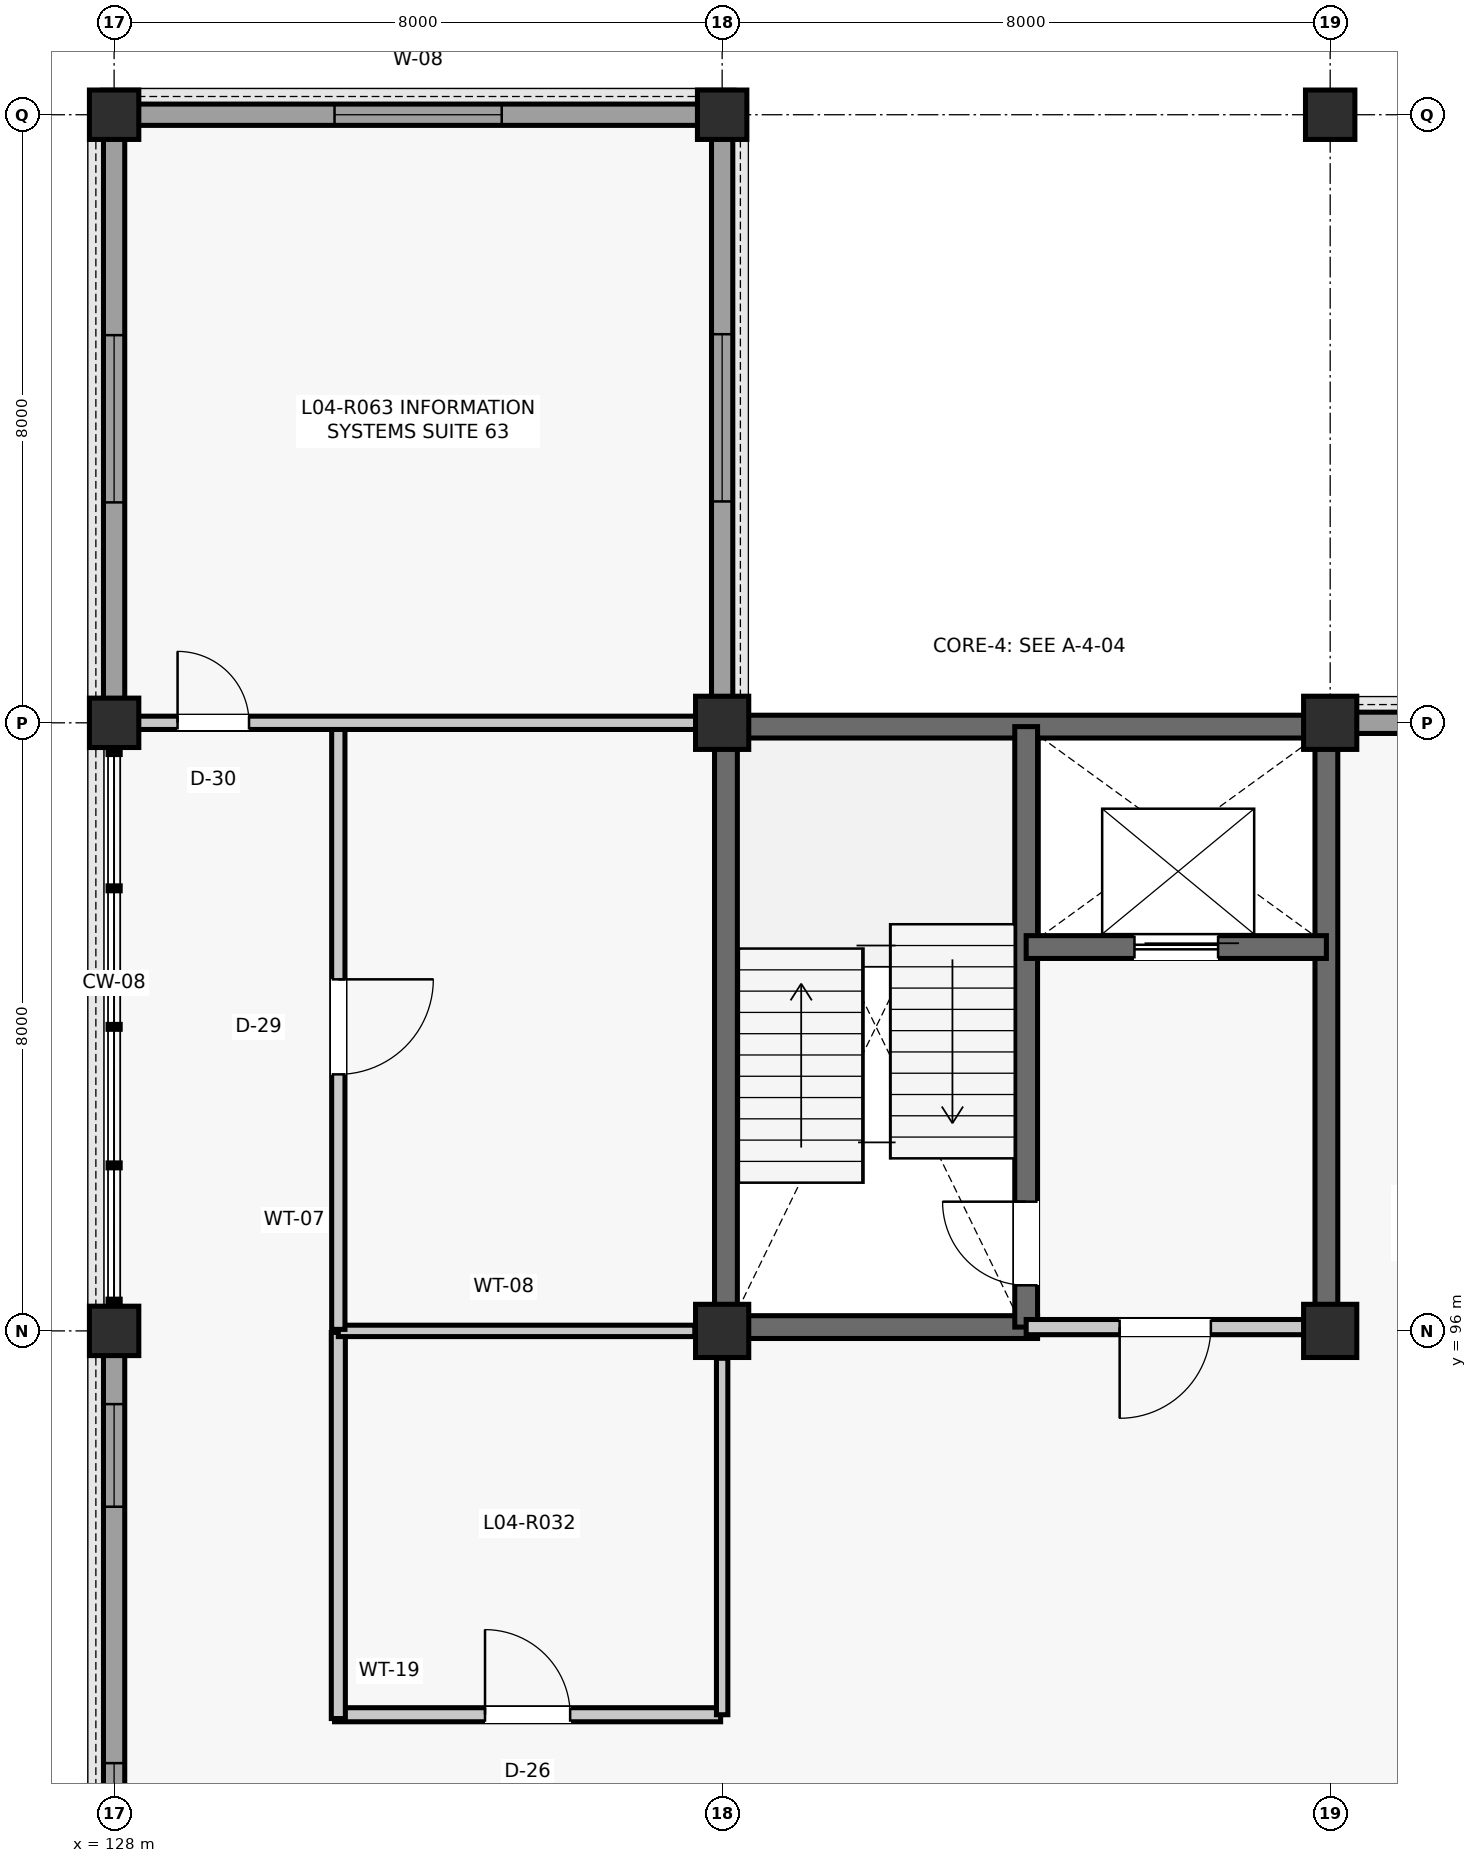
"""IFC4 building model, lengths in metres.
Left out: names, types, materials, properties, quantities, classifications, styles, units other than length and angle.
Written with IfcOpenShell. Run it as: python <this file> out.ifc"""

import sys

from ifc_helpers import new_model, si_unit, direction, frame, frame_2d, origin, origin_2d, place, context, subcontext, project, spatial, rectangle, extrude, element, fill, save


model = new_model("IFC4")
c1 = context("Model", 3, precision=1e-05, world=origin(), true_north=direction((0.0, 1.0)))
c2 = subcontext(c1, "Body", "Model", "MODEL_VIEW")
j1 = project(units=[si_unit("LENGTHUNIT", "METRE"), si_unit("PLANEANGLEUNIT", "RADIAN")], contexts=[c1])
p1 = place(None, origin())
s1 = spatial("IfcSite", under=j1, at=p1, CompositionType="ELEMENT")
p2 = place(p1, origin())
s2 = spatial("IfcBuilding", under=s1, at=p2, CompositionType="ELEMENT")
p3 = place(p2, frame((0.0, 0.0, 17.82)))
s3 = spatial("IfcBuildingStorey", under=s2, at=p3, CompositionType="ELEMENT", Elevation=17.82)
for number, where, z_axis, x_axis in (
    (1, (128.0, 96.0, 0.0), (0.0, 0.0, 1.0), (1.0, 0.0, 0.0)),
    (2, (128.0, 104.0, 0.0), (0.0, 0.0, 1.0), (1.0, 0.0, 0.0)),
    (3, (128.0, 112.0, 0.0), (0.0, 0.0, 1.0), (1.0, 0.0, 0.0)),
):
    element("IfcColumn", number, at=place(p3, frame(where, z_axis=z_axis, x_axis=x_axis)), inside=s3, PredefinedType="COLUMN", context=c2, shape_type="SweptSolid", body=[
        extrude(rectangle(XDim=0.65, YDim=0.65, at=origin_2d()), origin(), (0.0, 0.0, 1.0), 3.96),
    ])
for number, where, z_axis, x_axis in (
    (4, (136.0, 96.0, 0.0), (0.0, 0.0, 1.0), (1.0, 0.0, 0.0)),
    (5, (136.0, 104.0, 0.0), (0.0, 0.0, 1.0), (1.0, 0.0, 0.0)),
):
    element("IfcColumn", number, at=place(p3, frame(where, z_axis=z_axis, x_axis=x_axis)), inside=s3, PredefinedType="COLUMN", context=c2, shape_type="SweptSolid", body=[
        extrude(rectangle(XDim=0.7, YDim=0.7, at=origin_2d()), origin(), (0.0, 0.0, 1.0), 3.96),
    ])
p4 = place(p3, frame((136.0, 112.0, 0.0), z_axis=(0.0, 0.0, 1.0), x_axis=(1.0, 0.0, 0.0)))
e6 = element("IfcColumn", 6, at=p4, inside=s3, PredefinedType="COLUMN", context=c2, shape_type="SweptSolid", body=[
    extrude(rectangle(XDim=0.65, YDim=0.65, at=origin_2d()), origin(), (0.0, 0.0, 1.0), 3.96),
])
for number, where, z_axis, x_axis in (
    (7, (144.0, 96.0, 0.0), (0.0, 0.0, 1.0), (1.0, 0.0, 0.0)),
    (8, (144.0, 104.0, 0.0), (0.0, 0.0, 1.0), (1.0, 0.0, 0.0)),
):
    element("IfcColumn", number, at=place(p3, frame(where, z_axis=z_axis, x_axis=x_axis)), inside=s3, PredefinedType="COLUMN", context=c2, shape_type="SweptSolid", body=[
        extrude(rectangle(XDim=0.7, YDim=0.7, at=origin_2d()), origin(), (0.0, 0.0, 1.0), 3.96),
    ])
p5 = place(p3, frame((144.0, 112.0, 0.0), z_axis=(0.0, 0.0, 1.0), x_axis=(1.0, 0.0, 0.0)))
e9 = element("IfcColumn", 9, at=p5, inside=s3, PredefinedType="COLUMN", context=c2, shape_type="SweptSolid", body=[
    extrude(rectangle(XDim=0.65, YDim=0.65, at=origin_2d()), origin(), (0.0, 0.0, 1.0), 3.96),
])
p6 = place(p3, frame((128.0, 88.31, 0.0), z_axis=(0.0, 0.0, 1.0), x_axis=(0.0, 1.0, 0.0)))
e10 = element("IfcWall", 10, at=p6, inside=s3, PredefinedType="SOLIDWALL", context=c2, shape_type="SweptSolid", body=[
    extrude(rectangle(XDim=7.38, YDim=0.28, at=frame_2d((3.69, 0.0))), origin(), (0.0, 0.0, 1.0), 3.377),
])
p7 = place(p6, frame((0.653, 0.0, 0.95)))
e11 = element("IfcOpeningElement", 11, at=p7, cuts=e10, PredefinedType="OPENING", context=c2, shape_type="SweptSolid", body=[
    extrude(rectangle(XDim=1.35, YDim=1.9, at=frame_2d((0.675, 0.95))), frame((0.0, 0.15, 0.0), z_axis=(0.0, -1.0, 0.0), x_axis=(1.0, 0.0, 0.0)), (0.0, 0.0, 1.0), 0.3),
])
p8 = place(p6, frame((5.377, 0.0, 0.95)))
e12 = element("IfcOpeningElement", 12, at=p8, cuts=e10, PredefinedType="OPENING", context=c2, shape_type="SweptSolid", body=[
    extrude(rectangle(XDim=1.35, YDim=1.9, at=frame_2d((0.675, 0.95))), frame((0.0, 0.15, 0.0), z_axis=(0.0, -1.0, 0.0), x_axis=(1.0, 0.0, 0.0)), (0.0, 0.0, 1.0), 0.3),
])
p9 = place(p3, frame((128.31, 112.0, 0.0), z_axis=(0.0, 0.0, 1.0), x_axis=(1.0, 0.0, 0.0)))
e13 = element("IfcWall", 13, at=p9, inside=s3, PredefinedType="SOLIDWALL", context=c2, shape_type="SweptSolid", body=[
    extrude(rectangle(XDim=7.38, YDim=0.28, at=frame_2d((3.69, 0.0))), origin(), (0.0, 0.0, 1.0), 3.314),
])
p10 = place(p9, frame((2.59, 0.0, 0.9)))
e14 = element("IfcOpeningElement", 14, at=p10, cuts=e13, PredefinedType="OPENING", context=c2, shape_type="SweptSolid", body=[
    extrude(rectangle(XDim=2.2, YDim=2.0, at=frame_2d((1.1, 1.0))), frame((0.0, 0.15, 0.0), z_axis=(0.0, -1.0, 0.0), x_axis=(1.0, 0.0, 0.0)), (0.0, 0.0, 1.0), 0.3),
])
p11 = place(p3, frame((128.0, 104.31, 0.0), z_axis=(0.0, 0.0, 1.0), x_axis=(0.0, 1.0, 0.0)))
e15 = element("IfcWall", 15, at=p11, inside=s3, PredefinedType="SOLIDWALL", context=c2, shape_type="SweptSolid", body=[
    extrude(rectangle(XDim=7.38, YDim=0.28, at=frame_2d((3.69, 0.0))), origin(), (0.0, 0.0, 1.0), 3.374),
])
p12 = place(p11, frame((2.59, 0.0, 0.9)))
e16 = element("IfcOpeningElement", 16, at=p12, cuts=e15, PredefinedType="OPENING", context=c2, shape_type="SweptSolid", body=[
    extrude(rectangle(XDim=2.2, YDim=2.0, at=frame_2d((1.1, 1.0))), frame((0.0, 0.15, 0.0), z_axis=(0.0, -1.0, 0.0), x_axis=(1.0, 0.0, 0.0)), (0.0, 0.0, 1.0), 0.3),
])
p13 = place(p3, frame((136.0, 104.335, 0.0), z_axis=(0.0, 0.0, 1.0), x_axis=(0.0, 1.0, 0.0)))
e17 = element("IfcWall", 17, at=p13, inside=s3, PredefinedType="SOLIDWALL", context=c2, shape_type="SweptSolid", body=[
    extrude(rectangle(XDim=7.355, YDim=0.28, at=frame_2d((3.677, 0.0))), origin(), (0.0, 0.0, 1.0), 3.314),
])
p14 = place(p13, frame((2.577, 0.0, 0.9)))
e18 = element("IfcOpeningElement", 18, at=p14, cuts=e17, PredefinedType="OPENING", context=c2, shape_type="SweptSolid", body=[
    extrude(rectangle(XDim=2.2, YDim=2.0, at=frame_2d((1.1, 1.0))), frame((0.0, 0.15, 0.0), z_axis=(0.0, -1.0, 0.0), x_axis=(1.0, 0.0, 0.0)), (0.0, 0.0, 1.0), 0.3),
])
p15 = place(p3, frame((144.335, 104.0, 0.0), z_axis=(0.0, 0.0, 1.0), x_axis=(1.0, 0.0, 0.0)))
e19 = element("IfcWall", 19, at=p15, inside=s3, PredefinedType="SOLIDWALL", context=c2, shape_type="SweptSolid", body=[
    extrude(rectangle(XDim=7.355, YDim=0.28, at=frame_2d((3.677, 0.0))), origin(), (0.0, 0.0, 1.0), 3.377),
])
p16 = place(p15, frame((0.749, 0.0, 0.95)))
e20 = element("IfcOpeningElement", 20, at=p16, cuts=e19, PredefinedType="OPENING", context=c2, shape_type="SweptSolid", body=[
    extrude(rectangle(XDim=1.15, YDim=1.65, at=frame_2d((0.575, 0.825))), frame((0.0, 0.15, 0.0), z_axis=(0.0, -1.0, 0.0), x_axis=(1.0, 0.0, 0.0)), (0.0, 0.0, 1.0), 0.3),
])
p17 = place(p15, frame((5.456, 0.0, 0.95)))
e21 = element("IfcOpeningElement", 21, at=p17, cuts=e19, PredefinedType="OPENING", context=c2, shape_type="SweptSolid", body=[
    extrude(rectangle(XDim=1.15, YDim=1.65, at=frame_2d((0.575, 0.825))), frame((0.0, 0.15, 0.0), z_axis=(0.0, -1.0, 0.0), x_axis=(1.0, 0.0, 0.0)), (0.0, 0.0, 1.0), 0.3),
])
p18 = place(p3, frame((136.05, 96.24, 0.0), z_axis=(0.0, 0.0, 1.0), x_axis=(0.0, 1.0, 0.0)))
e22 = element("IfcWall", 22, at=p18, inside=s3, PredefinedType="SHEAR", context=c2, shape_type="SweptSolid", body=[
    extrude(rectangle(XDim=7.52, YDim=0.3, at=frame_2d((3.76, 0.0))), origin(), (0.0, 0.0, 1.0), 3.462),
])
p19 = place(p3, frame((136.24, 103.95, 0.0), z_axis=(0.0, 0.0, 1.0), x_axis=(1.0, 0.0, 0.0)))
e23 = element("IfcWall", 23, at=p19, inside=s3, PredefinedType="SHEAR", context=c2, shape_type="SweptSolid", body=[
    extrude(rectangle(XDim=7.52, YDim=0.3, at=frame_2d((3.76, 0.0))), origin(), (0.0, 0.0, 1.0), 3.307),
])
p20 = place(p3, frame((143.95, 96.24, 0.0), z_axis=(0.0, 0.0, 1.0), x_axis=(0.0, 1.0, 0.0)))
e24 = element("IfcWall", 24, at=p20, inside=s3, PredefinedType="SHEAR", context=c2, shape_type="SweptSolid", body=[
    extrude(rectangle(XDim=7.52, YDim=0.3, at=frame_2d((3.76, 0.0))), origin(), (0.0, 0.0, 1.0), 3.257),
])
p21 = place(p3, frame((136.24, 96.05, 0.0), z_axis=(0.0, 0.0, 1.0), x_axis=(1.0, 0.0, 0.0)))
e25 = element("IfcWall", 25, at=p21, inside=s3, PredefinedType="SHEAR", context=c2, shape_type="SweptSolid", body=[
    extrude(rectangle(XDim=3.91, YDim=0.3, at=frame_2d((1.955, 0.0))), origin(), (0.0, 0.0, 1.0), 3.263),
])
p22 = place(p3, frame((140.0, 96.05, 0.0), z_axis=(0.0, 0.0, 1.0), x_axis=(0.0, 1.0, 0.0)))
e26 = element("IfcWall", 26, at=p22, inside=s3, PredefinedType="SHEAR", context=c2, shape_type="SweptSolid", body=[
    extrude(rectangle(XDim=7.9, YDim=0.3, at=frame_2d((3.95, 0.0))), origin(), (0.0, 0.0, 1.0), 3.263),
])
p23 = place(p22, frame((0.55, 0.0, 0.0)))
e27 = element("IfcOpeningElement", 27, at=p23, cuts=e26, PredefinedType="OPENING", context=c2, shape_type="SweptSolid", body=[
    extrude(rectangle(XDim=1.1, YDim=2.15, at=frame_2d((0.55, 1.075))), frame((0.0, 0.16, 0.0), z_axis=(0.0, -1.0, 0.0), x_axis=(1.0, 0.0, 0.0)), (0.0, 0.0, 1.0), 0.32),
])
p24 = place(p3, frame((140.0, 101.05, 0.0), z_axis=(0.0, 0.0, 1.0), x_axis=(1.0, 0.0, 0.0)))
e28 = element("IfcWall", 28, at=p24, inside=s3, PredefinedType="SHEAR", context=c2, shape_type="SweptSolid", body=[
    extrude(rectangle(XDim=3.95, YDim=0.3, at=frame_2d((1.975, 0.0))), origin(), (0.0, 0.0, 1.0), 3.257),
])
p25 = place(p24, frame((1.425, 0.0, 0.0)))
e29 = element("IfcOpeningElement", 29, at=p25, cuts=e28, PredefinedType="OPENING", context=c2, shape_type="SweptSolid", body=[
    extrude(rectangle(XDim=1.1, YDim=2.2, at=frame_2d((0.55, 1.1))), frame((0.0, 0.16, 0.0), z_axis=(0.0, -1.0, 0.0), x_axis=(1.0, 0.0, 0.0)), (0.0, 0.0, 1.0), 0.32),
])
p26 = place(p3, frame((140.0, 96.05, 0.0), z_axis=(0.0, 0.0, 1.0), x_axis=(1.0, 0.0, 0.0)))
e30 = element("IfcWall", 30, at=p26, inside=s3, PredefinedType="PARTITIONING", context=c2, shape_type="SweptSolid", body=[
    extrude(rectangle(XDim=3.66, YDim=0.2, at=frame_2d((1.83, 0.0))), origin(), (0.0, 0.0, 1.0), 3.263),
])
p27 = place(p26, frame((1.23, 0.0, 0.0)))
e31 = element("IfcOpeningElement", 31, at=p27, cuts=e30, PredefinedType="OPENING", context=c2, shape_type="SweptSolid", body=[
    extrude(rectangle(XDim=1.2, YDim=2.15, at=frame_2d((0.6, 1.075))), frame((0.0, 0.11, 0.0), z_axis=(0.0, -1.0, 0.0), x_axis=(1.0, 0.0, 0.0)), (0.0, 0.0, 1.0), 0.22),
])
p28 = place(p3, frame((130.9, 90.95, 0.0), z_axis=(0.0, 0.0, 1.0), x_axis=(1.0, 0.0, 0.0)))
e32 = element("IfcWall", 32, at=p28, inside=s3, PredefinedType="PARTITIONING", context=c2, shape_type="SweptSolid", body=[
    extrude(rectangle(XDim=5.08, YDim=0.185, at=frame_2d((2.54, 0.0))), origin(), (0.0, 0.0, 1.0), 3.263),
])
p29 = place(p28, frame((1.98, 0.0, 0.0)))
e33 = element("IfcOpeningElement", 33, at=p29, cuts=e32, PredefinedType="OPENING", context=c2, shape_type="SweptSolid", body=[
    extrude(rectangle(XDim=1.12, YDim=2.22, at=frame_2d((0.56, 1.11))), frame((0.0, 0.103, 0.0), z_axis=(0.0, -1.0, 0.0), x_axis=(1.0, 0.0, 0.0)), (0.0, 0.0, 1.0), 0.205),
])
p30 = place(p3, frame((130.95, 90.9, 0.0), z_axis=(0.0, 0.0, 1.0), x_axis=(0.0, 1.0, 0.0)))
e34 = element("IfcWall", 34, at=p30, inside=s3, PredefinedType="PARTITIONING", context=c2, shape_type="SweptSolid", body=[
    extrude(rectangle(XDim=5.08, YDim=0.185, at=frame_2d((2.54, 0.0))), origin(), (0.0, 0.0, 1.0), 3.257),
])
p31 = place(p3, frame((130.95, 96.0, 0.0), z_axis=(0.0, 0.0, 1.0), x_axis=(1.0, 0.0, 0.0)))
e35 = element("IfcWall", 35, at=p31, inside=s3, PredefinedType="PARTITIONING", context=c2, shape_type="SweptSolid", body=[
    extrude(rectangle(XDim=4.69, YDim=0.15, at=frame_2d((2.345, 0.0))), origin(), (0.0, 0.0, 1.0), 3.257),
])
p32 = place(p3, frame((136.0, 90.95, 0.0), z_axis=(0.0, 0.0, 1.0), x_axis=(0.0, 1.0, 0.0)))
e36 = element("IfcWall", 36, at=p32, inside=s3, PredefinedType="PARTITIONING", context=c2, shape_type="SweptSolid", body=[
    extrude(rectangle(XDim=4.69, YDim=0.15, at=frame_2d((2.345, 0.0))), origin(), (0.0, 0.0, 1.0), 3.263),
])
p33 = place(p3, frame((130.95, 96.02, 0.0), z_axis=(0.0, 0.0, 1.0), x_axis=(0.0, 1.0, 0.0)))
e37 = element("IfcWall", 37, at=p33, inside=s3, PredefinedType="PARTITIONING", context=c2, shape_type="SweptSolid", body=[
    extrude(rectangle(XDim=7.96, YDim=0.175, at=frame_2d((3.98, 0.0))), origin(), (0.0, 0.0, 1.0), 3.257),
])
p34 = place(p33, frame((3.355, 0.0, 0.0)))
e38 = element("IfcOpeningElement", 38, at=p34, cuts=e37, PredefinedType="OPENING", context=c2, shape_type="SweptSolid", body=[
    extrude(rectangle(XDim=1.25, YDim=2.18, at=frame_2d((0.625, 1.09))), frame((0.0, 0.097, 0.0), z_axis=(0.0, -1.0, 0.0), x_axis=(1.0, 0.0, 0.0)), (0.0, 0.0, 1.0), 0.195),
])
p35 = place(p3, frame((128.315, 104.0, 0.0), z_axis=(0.0, 0.0, 1.0), x_axis=(1.0, 0.0, 0.0)))
e39 = element("IfcWall", 39, at=p35, inside=s3, PredefinedType="PARTITIONING", context=c2, shape_type="SweptSolid", body=[
    extrude(rectangle(XDim=7.345, YDim=0.175, at=frame_2d((3.672, 0.0))), origin(), (0.0, 0.0, 1.0), 3.263),
])
p36 = place(p35, frame((0.52, 0.0, 0.0)))
e40 = element("IfcOpeningElement", 40, at=p36, cuts=e39, PredefinedType="OPENING", context=c2, shape_type="SweptSolid", body=[
    extrude(rectangle(XDim=0.94, YDim=2.12, at=frame_2d((0.47, 1.06))), frame((0.0, 0.097, 0.0), z_axis=(0.0, -1.0, 0.0), x_axis=(1.0, 0.0, 0.0)), (0.0, 0.0, 1.0), 0.195),
])
p37 = place(p7, origin())
e41 = element("IfcWindow", 41, at=p37, inside=s3, PartitioningType="SINGLE_PANEL", PredefinedType="WINDOW", context=c2, shape_type="SweptSolid", body=[
    extrude(rectangle(XDim=1.35, YDim=1.9, at=frame_2d((0.675, 0.95))), frame((0.0, 0.03, 0.0), z_axis=(0.0, -1.0, 0.0), x_axis=(1.0, 0.0, 0.0)), (0.0, 0.0, 1.0), 0.06),
])
fill(e11, e41)
p38 = place(p8, origin())
e42 = element("IfcWindow", 42, at=p38, inside=s3, PartitioningType="SINGLE_PANEL", PredefinedType="WINDOW", context=c2, shape_type="SweptSolid", body=[
    extrude(rectangle(XDim=1.35, YDim=1.9, at=frame_2d((0.675, 0.95))), frame((0.0, 0.03, 0.0), z_axis=(0.0, -1.0, 0.0), x_axis=(1.0, 0.0, 0.0)), (0.0, 0.0, 1.0), 0.06),
])
fill(e12, e42)
p39 = place(p10, origin())
e43 = element("IfcWindow", 43, at=p39, inside=s3, PartitioningType="SINGLE_PANEL", PredefinedType="WINDOW", context=c2, shape_type="SweptSolid", body=[
    extrude(rectangle(XDim=2.2, YDim=2.0, at=frame_2d((1.1, 1.0))), frame((0.0, 0.03, 0.0), z_axis=(0.0, -1.0, 0.0), x_axis=(1.0, 0.0, 0.0)), (0.0, 0.0, 1.0), 0.06),
])
fill(e14, e43)
p40 = place(p12, origin())
e44 = element("IfcWindow", 44, at=p40, inside=s3, PartitioningType="SINGLE_PANEL", PredefinedType="WINDOW", context=c2, shape_type="SweptSolid", body=[
    extrude(rectangle(XDim=2.2, YDim=2.0, at=frame_2d((1.1, 1.0))), frame((0.0, 0.03, 0.0), z_axis=(0.0, -1.0, 0.0), x_axis=(1.0, 0.0, 0.0)), (0.0, 0.0, 1.0), 0.06),
])
fill(e16, e44)
p41 = place(p14, origin())
e45 = element("IfcWindow", 45, at=p41, inside=s3, PartitioningType="SINGLE_PANEL", PredefinedType="WINDOW", context=c2, shape_type="SweptSolid", body=[
    extrude(rectangle(XDim=2.2, YDim=2.0, at=frame_2d((1.1, 1.0))), frame((0.0, 0.03, 0.0), z_axis=(0.0, -1.0, 0.0), x_axis=(1.0, 0.0, 0.0)), (0.0, 0.0, 1.0), 0.06),
])
fill(e18, e45)
p42 = place(p23, origin())
e46 = element("IfcDoor", 46, at=p42, inside=s3, OperationType="SINGLE_SWING_RIGHT", PredefinedType="DOOR", context=c2, shape_type="SweptSolid", body=[
    extrude(rectangle(XDim=1.1, YDim=2.15, at=frame_2d((0.55, 1.075))), frame((0.0, 0.025, 0.0), z_axis=(0.0, -1.0, 0.0), x_axis=(1.0, 0.0, 0.0)), (0.0, 0.0, 1.0), 0.05),
])
fill(e27, e46)
p43 = place(p25, origin())
e47 = element("IfcDoor", 47, at=p43, inside=s3, OperationType="SLIDING_TO_LEFT", PredefinedType="DOOR", context=c2, shape_type="SweptSolid", body=[
    extrude(rectangle(XDim=1.1, YDim=2.2, at=frame_2d((0.55, 1.1))), frame((0.0, 0.025, 0.0), z_axis=(0.0, -1.0, 0.0), x_axis=(1.0, 0.0, 0.0)), (0.0, 0.0, 1.0), 0.05),
])
fill(e29, e47)
p44 = place(p27, frame((1.2, 0.0, 0.0), z_axis=(0.0, 0.0, 1.0), x_axis=(-1.0, 0.0, 0.0)))
e48 = element("IfcDoor", 48, at=p44, inside=s3, OperationType="SINGLE_SWING_LEFT", PredefinedType="DOOR", context=c2, shape_type="SweptSolid", body=[
    extrude(rectangle(XDim=1.2, YDim=2.15, at=frame_2d((0.6, 1.075))), frame((0.0, 0.025, 0.0), z_axis=(0.0, -1.0, 0.0), x_axis=(1.0, 0.0, 0.0)), (0.0, 0.0, 1.0), 0.05),
])
fill(e31, e48)
p45 = place(p29, origin())
e49 = element("IfcDoor", 49, at=p45, inside=s3, OperationType="SINGLE_SWING_LEFT", PredefinedType="DOOR", context=c2, shape_type="SweptSolid", body=[
    extrude(rectangle(XDim=1.12, YDim=2.22, at=frame_2d((0.56, 1.11))), frame((0.0, 0.025, 0.0), z_axis=(0.0, -1.0, 0.0), x_axis=(1.0, 0.0, 0.0)), (0.0, 0.0, 1.0), 0.05),
])
fill(e33, e49)
p46 = place(p34, frame((1.25, 0.0, 0.0), z_axis=(0.0, 0.0, 1.0), x_axis=(-1.0, 0.0, 0.0)))
e50 = element("IfcDoor", 50, at=p46, inside=s3, OperationType="SINGLE_SWING_RIGHT", PredefinedType="DOOR", context=c2, shape_type="SweptSolid", body=[
    extrude(rectangle(XDim=1.25, YDim=2.18, at=frame_2d((0.625, 1.09))), frame((0.0, 0.025, 0.0), z_axis=(0.0, -1.0, 0.0), x_axis=(1.0, 0.0, 0.0)), (0.0, 0.0, 1.0), 0.05),
])
fill(e38, e50)
p47 = place(p36, origin())
e51 = element("IfcDoor", 51, at=p47, inside=s3, OperationType="SINGLE_SWING_LEFT", PredefinedType="DOOR", context=c2, shape_type="SweptSolid", body=[
    extrude(rectangle(XDim=0.94, YDim=2.12, at=frame_2d((0.47, 1.06))), frame((0.0, 0.025, 0.0), z_axis=(0.0, -1.0, 0.0), x_axis=(1.0, 0.0, 0.0)), (0.0, 0.0, 1.0), 0.05),
])
fill(e40, e51)
save(model, sys.argv[1])
